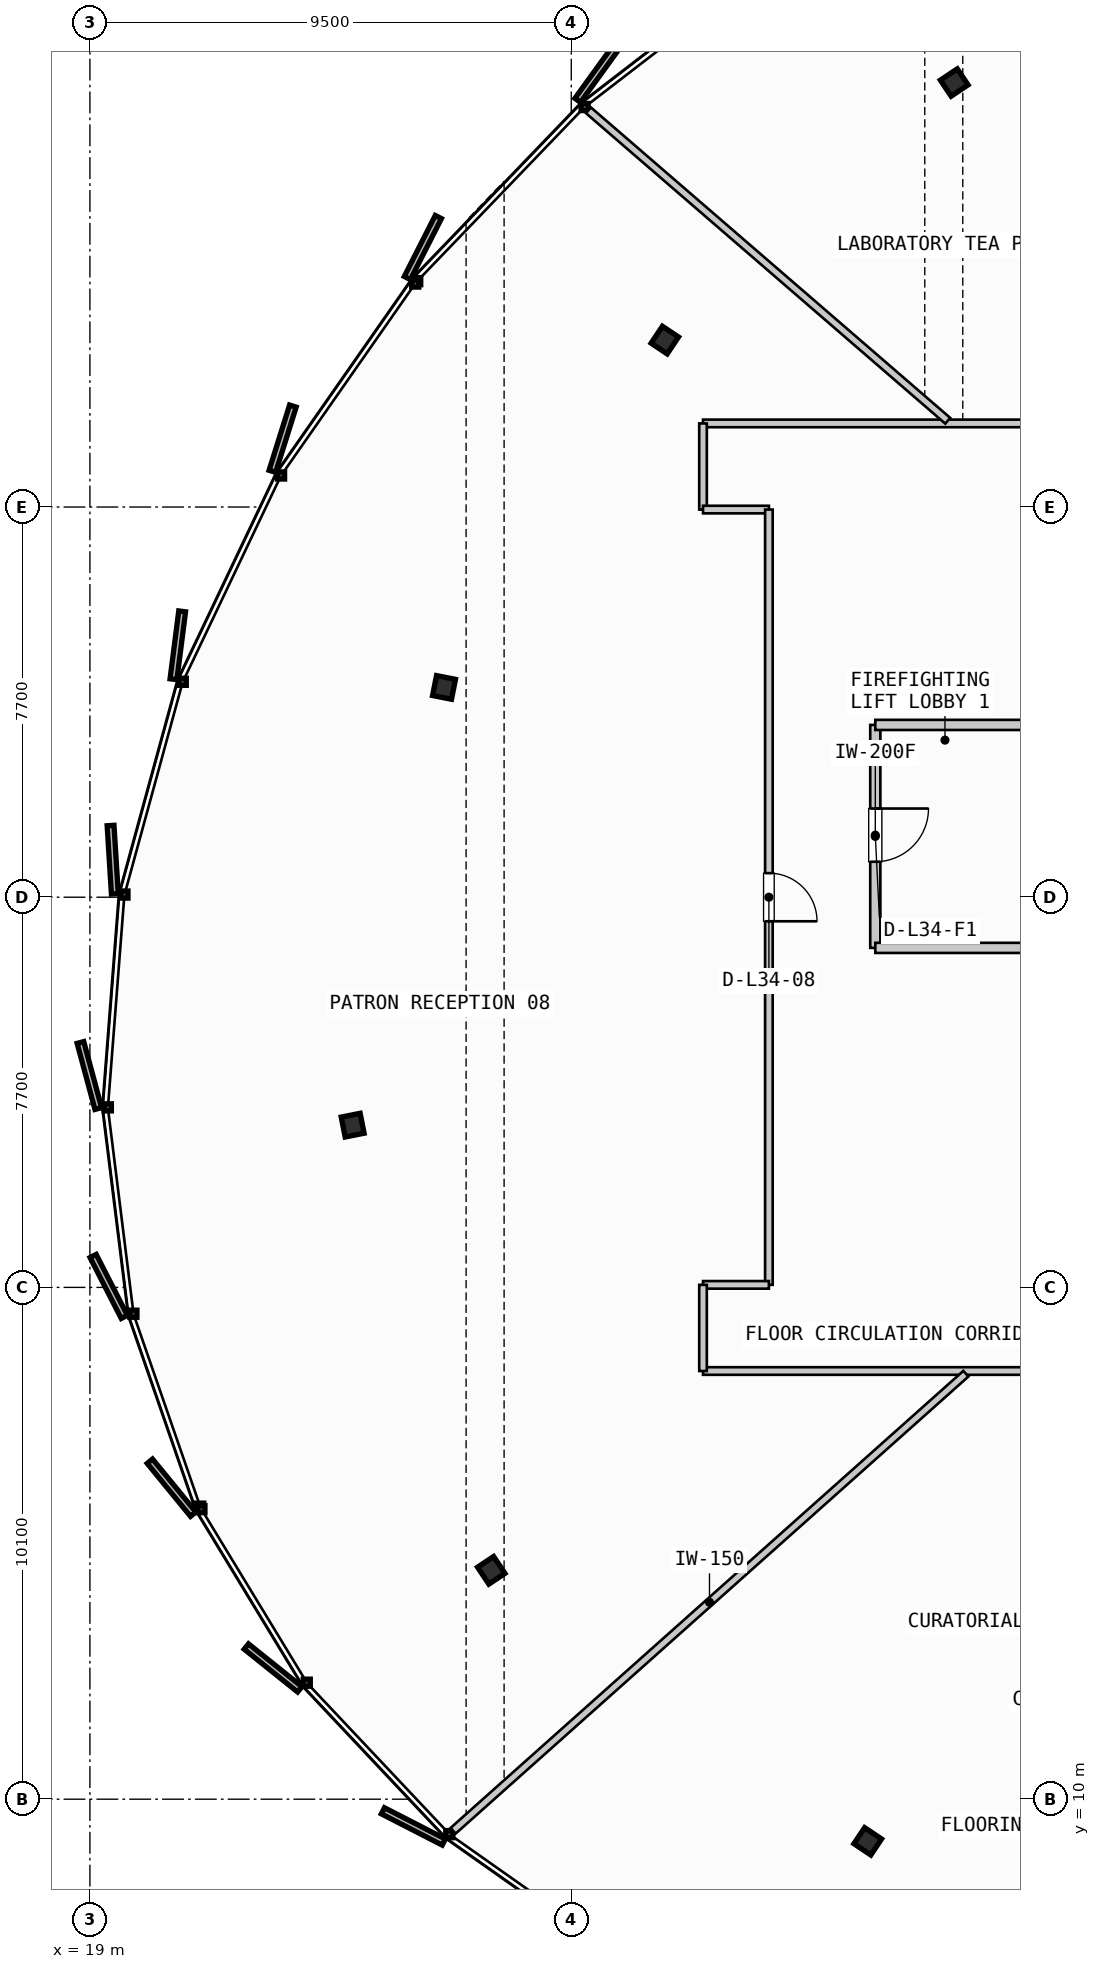
"""IFC4 building model, lengths in metres.
Left out: names, types, materials, properties, quantities, classifications, styles, units other than length and angle.
Written with IfcOpenShell. Run it as: python <this file> out.ifc"""

import sys

from ifc_helpers import new_model, si_unit, direction, frame, frame_2d, origin, origin_2d, place, context, subcontext, project, spatial, rectangle, i_section, extrude, source, transform, mapped, element, fill, save


model = new_model("IFC4")
c1 = context("Model", 3, precision=1e-05, world=origin(), true_north=direction((0.0, 1.0)))
c2 = subcontext(c1, "Body", "Model", "MODEL_VIEW")
j1 = project(units=[si_unit("LENGTHUNIT", "METRE"), si_unit("PLANEANGLEUNIT", "RADIAN")], contexts=[c1])
p1 = place(None, origin())
s1 = spatial("IfcSite", under=j1, at=p1, CompositionType="ELEMENT")
p2 = place(p1, origin())
s2 = spatial("IfcBuilding", under=s1, at=p2, CompositionType="ELEMENT")
p3 = place(p2, frame((0.0, 0.0, 135.9)))
s3 = spatial("IfcBuildingStorey", under=s2, at=p3, CompositionType="ELEMENT", Elevation=135.9)
m1 = source(origin(), c2, "Body", "SweptSolid", [
    extrude(i_section(OverallWidth=0.401, OverallDepth=0.381, WebThickness=0.032, FlangeThickness=0.051, FilletRadius=0.015, at=origin_2d()), origin(), (0.0, 0.0, 1.0), 3.3),
])
for number, where, z_axis, x_axis in (
    (1, (36.058, 43.877, 0.0), (0.0, 0.0, 1.0), (-0.556, 0.831, 0.0)),
    (2, (30.346, 38.794, 0.0), (0.0, 0.0, 1.0), (-0.831, 0.556, 0.0)),
    (3, (25.989, 31.94, 0.0), (0.0, 0.0, 1.0), (-0.981, 0.195, 0.0)),
    (4, (24.185, 23.302, 0.0), (0.0, 0.0, 1.0), (-0.981, -0.195, 0.0)),
    (5, (26.921, 14.517, 0.0), (0.0, 0.0, 1.0), (-0.831, -0.556, 0.0)),
    (6, (34.351, 9.168, 0.0), (0.0, 0.0, 1.0), (-0.556, -0.831, 0.0)),
):
    element("IfcColumn", number, at=place(p3, frame(where, z_axis=z_axis, x_axis=x_axis)), inside=s3, PredefinedType="COLUMN", context=c2, shape_type="MappedRepresentation", body=[
        mapped(m1, transform((0.0, 0.0, 0.0), scale=1.0)),
    ])
p4 = place(p3, frame((34.5, 31.2, 0.0), z_axis=(0.0, 0.0, 1.0), x_axis=(0.0, -1.0, 0.0)))
e7 = element("IfcWall", 7, at=p4, inside=s3, PredefinedType="PARTITIONING", context=c2, shape_type="SweptSolid", body=[
    extrude(rectangle(XDim=4.4, YDim=0.2, at=frame_2d((2.2, 0.0))), origin(), (0.0, 0.0, 1.0), 2.445),
])
p5 = place(p4, frame((1.65, 0.0, 0.0)))
e8 = element("IfcOpeningElement", 8, at=p5, cuts=e7, PredefinedType="OPENING", context=c2, shape_type="SweptSolid", body=[
    extrude(rectangle(XDim=1.05, YDim=2.15, at=frame_2d((0.525, 1.075))), frame((0.0, 0.11, 0.0), z_axis=(0.0, -1.0, 0.0), x_axis=(1.0, 0.0, 0.0)), (0.0, 0.0, 1.0), 0.22),
])
for number, where, z_axis, x_axis in (
    (9, (34.5, 26.8, 0.0), (0.0, 0.0, 1.0), (1.0, 0.0, 0.0)),
    (10, (34.5, 31.2, 0.0), (0.0, 0.0, 1.0), (1.0, 0.0, 0.0)),
):
    element("IfcWall", number, at=place(p3, frame(where, z_axis=z_axis, x_axis=x_axis)), inside=s3, PredefinedType="PARTITIONING", context=c2, shape_type="SweptSolid", body=[
        extrude(rectangle(XDim=3.215, YDim=0.2, at=frame_2d((1.607, 0.0))), origin(), (0.0, 0.0, 1.0), 2.445),
    ])
p6 = place(p3, frame((31.1, 18.45, 0.0), z_axis=(0.0, 0.0, 1.0), x_axis=(1.0, 0.0, 0.0)))
e11 = element("IfcWall", 11, at=p6, inside=s3, PredefinedType="PARTITIONING", context=c2, shape_type="SweptSolid", body=[
    extrude(rectangle(XDim=31.4, YDim=0.15, at=frame_2d((15.7, 0.0))), origin(), (0.0, 0.0, 1.0), 2.445),
])
p7 = place(p6, frame((10.031, 0.0, 0.0)))
e12 = element("IfcOpeningElement", 12, at=p7, cuts=e11, PredefinedType="OPENING", context=c2, shape_type="SweptSolid", body=[
    extrude(rectangle(XDim=0.95, YDim=2.15, at=frame_2d((0.475, 1.075))), frame((0.0, 0.085, 0.0), z_axis=(0.0, -1.0, 0.0), x_axis=(1.0, 0.0, 0.0)), (0.0, 0.0, 1.0), 0.17),
])
p8 = place(p6, frame((20.854, 0.0, 0.0)))
e13 = element("IfcOpeningElement", 13, at=p8, cuts=e11, PredefinedType="OPENING", context=c2, shape_type="SweptSolid", body=[
    extrude(rectangle(XDim=0.95, YDim=2.15, at=frame_2d((0.475, 1.075))), frame((0.0, 0.085, 0.0), z_axis=(0.0, -1.0, 0.0), x_axis=(1.0, 0.0, 0.0)), (0.0, 0.0, 1.0), 0.17),
])
p9 = place(p3, frame((62.5, 37.15, 0.0), z_axis=(0.0, 0.0, 1.0), x_axis=(-1.0, 0.0, 0.0)))
e14 = element("IfcWall", 14, at=p9, inside=s3, PredefinedType="PARTITIONING", context=c2, shape_type="SweptSolid", body=[
    extrude(rectangle(XDim=31.4, YDim=0.15, at=frame_2d((15.7, 0.0))), origin(), (0.0, 0.0, 1.0), 2.445),
])
p10 = place(p9, frame((7.961, 0.0, 0.0)))
e15 = element("IfcOpeningElement", 15, at=p10, cuts=e14, PredefinedType="OPENING", context=c2, shape_type="SweptSolid", body=[
    extrude(rectangle(XDim=0.95, YDim=2.15, at=frame_2d((0.475, 1.075))), frame((0.0, 0.085, 0.0), z_axis=(0.0, -1.0, 0.0), x_axis=(1.0, 0.0, 0.0)), (0.0, 0.0, 1.0), 0.17),
])
p11 = place(p9, frame((15.608, 0.0, 0.0)))
e16 = element("IfcOpeningElement", 16, at=p11, cuts=e14, PredefinedType="OPENING", context=c2, shape_type="SweptSolid", body=[
    extrude(rectangle(XDim=0.95, YDim=2.15, at=frame_2d((0.475, 1.075))), frame((0.0, 0.085, 0.0), z_axis=(0.0, -1.0, 0.0), x_axis=(1.0, 0.0, 0.0)), (0.0, 0.0, 1.0), 0.17),
])
p12 = place(p9, frame((22.904, 0.0, 0.0)))
e17 = element("IfcOpeningElement", 17, at=p12, cuts=e14, PredefinedType="OPENING", context=c2, shape_type="SweptSolid", body=[
    extrude(rectangle(XDim=0.95, YDim=2.15, at=frame_2d((0.475, 1.075))), frame((0.0, 0.085, 0.0), z_axis=(0.0, -1.0, 0.0), x_axis=(1.0, 0.0, 0.0)), (0.0, 0.0, 1.0), 0.17),
])
p13 = place(p3, frame((31.1, 37.15, 0.0), z_axis=(0.0, 0.0, 1.0), x_axis=(0.0, -1.0, 0.0)))
e18 = element("IfcWall", 18, at=p13, inside=s3, PredefinedType="PARTITIONING", context=c2, shape_type="SweptSolid", body=[
    extrude(rectangle(XDim=1.7, YDim=0.15, at=frame_2d((0.85, 0.0))), origin(), (0.0, 0.0, 1.0), 2.445),
])
p14 = place(p3, frame((31.1, 35.45, 0.0), z_axis=(0.0, 0.0, 1.0), x_axis=(1.0, 0.0, 0.0)))
e19 = element("IfcWall", 19, at=p14, inside=s3, PredefinedType="PARTITIONING", context=c2, shape_type="SweptSolid", body=[
    extrude(rectangle(XDim=1.3, YDim=0.15, at=frame_2d((0.65, 0.0))), origin(), (0.0, 0.0, 1.0), 2.445),
])
p15 = place(p3, frame((32.4, 35.45, 0.0), z_axis=(0.0, 0.0, 1.0), x_axis=(0.0, -1.0, 0.0)))
e20 = element("IfcWall", 20, at=p15, inside=s3, PredefinedType="PARTITIONING", context=c2, shape_type="SweptSolid", body=[
    extrude(rectangle(XDim=15.3, YDim=0.15, at=frame_2d((7.65, 0.0))), origin(), (0.0, 0.0, 1.0), 2.445),
])
p16 = place(p15, frame((7.175, 0.0, 0.0)))
e21 = element("IfcOpeningElement", 21, at=p16, cuts=e20, PredefinedType="OPENING", context=c2, shape_type="SweptSolid", body=[
    extrude(rectangle(XDim=0.95, YDim=2.15, at=frame_2d((0.475, 1.075))), frame((0.0, 0.085, 0.0), z_axis=(0.0, -1.0, 0.0), x_axis=(1.0, 0.0, 0.0)), (0.0, 0.0, 1.0), 0.17),
])
p17 = place(p3, frame((32.4, 20.15, 0.0), z_axis=(0.0, 0.0, 1.0), x_axis=(-1.0, 0.0, 0.0)))
e22 = element("IfcWall", 22, at=p17, inside=s3, PredefinedType="PARTITIONING", context=c2, shape_type="SweptSolid", body=[
    extrude(rectangle(XDim=1.3, YDim=0.15, at=frame_2d((0.65, 0.0))), origin(), (0.0, 0.0, 1.0), 2.445),
])
p18 = place(p3, frame((31.1, 20.15, 0.0), z_axis=(0.0, 0.0, 1.0), x_axis=(0.0, -1.0, 0.0)))
e23 = element("IfcWall", 23, at=p18, inside=s3, PredefinedType="PARTITIONING", context=c2, shape_type="SweptSolid", body=[
    extrude(rectangle(XDim=1.7, YDim=0.15, at=frame_2d((0.85, 0.0))), origin(), (0.0, 0.0, 1.0), 2.445),
])
p19 = place(p3, frame((36.288, 18.397, 0.0), z_axis=(0.0, 0.0, 1.0), x_axis=(-0.746524355817, -0.66535808868, 0.0)))
e24 = element("IfcWall", 24, at=p19, inside=s3, PredefinedType="PARTITIONING", context=c2, shape_type="SweptSolid", body=[
    extrude(rectangle(XDim=13.557, YDim=0.15, at=frame_2d((6.778, 0.0))), origin(), (0.0, 0.0, 1.0), 2.445),
])
p20 = place(p3, frame((42.366, 37.222, 0.0), z_axis=(0.0, 0.0, 1.0), x_axis=(-0.425227335241, 0.905086577828, 0.0)))
e25 = element("IfcWall", 25, at=p20, inside=s3, PredefinedType="PARTITIONING", context=c2, shape_type="SweptSolid", body=[
    extrude(rectangle(XDim=12.674, YDim=0.15, at=frame_2d((6.337, 0.0))), origin(), (0.0, 0.0, 1.0), 2.445),
])
p21 = place(p3, frame((35.93, 37.202, 0.0), z_axis=(0.0, 0.0, 1.0), x_axis=(-0.756714614839, 0.653745356916, 0.0)))
e26 = element("IfcWall", 26, at=p21, inside=s3, PredefinedType="PARTITIONING", context=c2, shape_type="SweptSolid", body=[
    extrude(rectangle(XDim=9.37, YDim=0.15, at=frame_2d((4.685, 0.0))), origin(), (0.0, 0.0, 1.0), 2.445),
])
m2 = source(origin(), c2, "Body", "SweptSolid", [
    extrude(rectangle(XDim=1.05, YDim=2.15, at=frame_2d((0.525, 1.075))), frame((0.0, 0.025, 0.0), z_axis=(0.0, -1.0, 0.0), x_axis=(1.0, 0.0, 0.0)), (0.0, 0.0, 1.0), 0.05),
])
p22 = place(p5, origin())
e27 = element("IfcDoor", 27, at=p22, inside=s3, OperationType="SINGLE_SWING_LEFT", PredefinedType="DOOR", context=c2, shape_type="MappedRepresentation", body=[
    mapped(m2, transform((0.0, 0.0, 0.0), scale=1.0)),
])
fill(e8, e27)
m3 = source(origin(), c2, "Body", "SweptSolid", [
    extrude(rectangle(XDim=0.95, YDim=2.15, at=frame_2d((0.475, 1.075))), frame((0.0, 0.025, 0.0), z_axis=(0.0, -1.0, 0.0), x_axis=(1.0, 0.0, 0.0)), (0.0, 0.0, 1.0), 0.05),
])
p23 = place(p16, origin())
e28 = element("IfcDoor", 28, at=p23, inside=s3, OperationType="SINGLE_SWING_RIGHT", PredefinedType="DOOR", context=c2, shape_type="MappedRepresentation", body=[
    mapped(m3, transform((0.0, 0.0, 0.0), scale=1.0)),
])
fill(e21, e28)
save(model, sys.argv[1])
